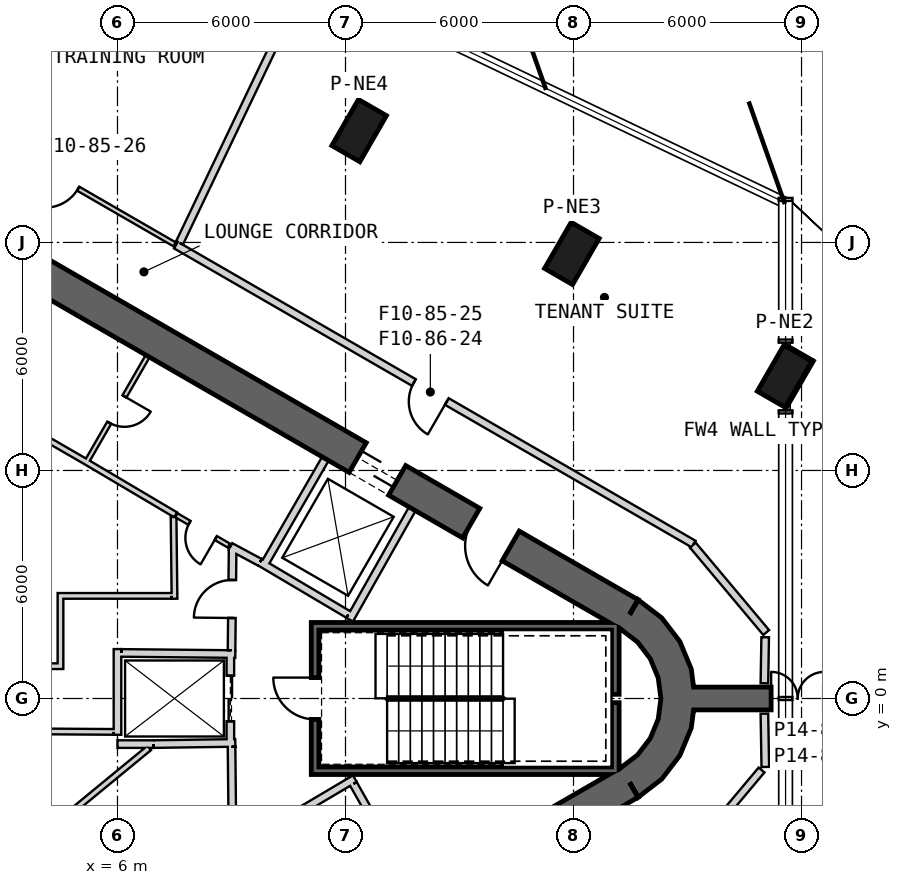
"""IFC4 building model, lengths in metres.
Left out: names, types, materials, properties, quantities, classifications, styles, units other than length and angle.
Written with IfcOpenShell. Run it as: python <this file> out.ifc"""

import sys

from ifc_helpers import new_model, si_unit, direction, frame, frame_2d, origin, origin_2d, place, context, subcontext, project, spatial, polyline, rectangle, outline, extrude, element, fill, save


model = new_model("IFC4")
c1 = context("Model", 3, precision=1e-05, world=origin(), true_north=direction((0.0, 1.0)))
c2 = subcontext(c1, "Body", "Model", "MODEL_VIEW")
j1 = project(units=[si_unit("LENGTHUNIT", "METRE"), si_unit("PLANEANGLEUNIT", "RADIAN")], contexts=[c1])
p1 = place(None, origin())
s1 = spatial("IfcSite", under=j1, at=p1, CompositionType="ELEMENT")
p2 = place(p1, origin())
s2 = spatial("IfcBuilding", under=s1, at=p2, CompositionType="ELEMENT")
p3 = place(p2, frame((0.0, 0.0, 368.9)))
s3 = spatial("IfcBuildingStorey", under=s2, at=p3, CompositionType="ELEMENT", Elevation=368.9)
for number, where, z_axis, x_axis in (
    (1, (23.555, 8.479, 0.0), (0.0, 0.0, 1.0), (0.5, 0.866, 0.0)),
    (2, (17.957, 11.71, 0.0), (0.0, 0.0, 1.0), (0.5, 0.866, 0.0)),
    (3, (12.359, 14.942, 0.0), (0.0, 0.0, 1.0), (0.5, 0.866, 0.0)),
):
    element("IfcColumn", number, at=place(p3, frame(where, z_axis=z_axis, x_axis=x_axis)), inside=s3, PredefinedType="COLUMN", context=c2, shape_type="SweptSolid", body=[
        extrude(rectangle(XDim=1.4, YDim=0.85, at=origin_2d()), origin(), (0.0, 0.0, 1.0), 3.9),
    ])
p4 = place(p3, frame((19.475, 2.208, 0.0), z_axis=(0.0, 0.0, 1.0), x_axis=(-0.866028369851, 0.499994862586, 0.0)))
e4 = element("IfcWall", 4, at=p4, inside=s3, PredefinedType="SHEAR", context=c2, shape_type="SweptSolid", body=[
    extrude(rectangle(XDim=31.523, YDim=0.9, at=frame_2d((15.762, 0.0))), origin(), (0.0, 0.0, 1.0), 3.9),
])
p5 = place(p4, frame((7.062, 0.0, 0.0)))
e5 = element("IfcOpeningElement", 5, at=p5, cuts=e4, PredefinedType="OPENING", context=c2, shape_type="SweptSolid", body=[
    extrude(rectangle(XDim=1.2, YDim=2.4, at=frame_2d((0.6, 1.2))), frame((0.0, 0.46, 0.0), z_axis=(0.0, -1.0, 0.0), x_axis=(1.0, 0.0, 0.0)), (0.0, 0.0, 1.0), 0.92),
])
p6 = place(p4, frame((3.612, 0.0, 0.0)))
e6 = element("IfcOpeningElement", 6, at=p6, cuts=e4, PredefinedType="OPENING", context=c2, shape_type="SweptSolid", body=[
    extrude(rectangle(XDim=1.2, YDim=2.4, at=frame_2d((0.6, 1.2))), frame((0.0, 0.46, 0.0), z_axis=(0.0, -1.0, 0.0), x_axis=(1.0, 0.0, 0.0)), (0.0, 0.0, 1.0), 0.92),
])
p7 = place(p4, frame((26.712, 0.0, 0.0)))
e7 = element("IfcOpeningElement", 7, at=p7, cuts=e4, PredefinedType="OPENING", context=c2, shape_type="SweptSolid", body=[
    extrude(rectangle(XDim=1.2, YDim=2.4, at=frame_2d((0.6, 1.2))), frame((0.0, 0.46, 0.0), z_axis=(0.0, -1.0, 0.0), x_axis=(1.0, 0.0, 0.0)), (0.0, 0.0, 1.0), 0.92),
])
p8 = place(p3, frame((-7.825, -17.97, 0.0), z_axis=(0.0, 0.0, 1.0), x_axis=(0.866028369851, 0.499994862586, 0.0)))
e8 = element("IfcWall", 8, at=p8, inside=s3, PredefinedType="SHEAR", context=c2, shape_type="SweptSolid", body=[
    extrude(rectangle(XDim=31.523, YDim=0.9, at=frame_2d((15.762, 0.0))), origin(), (0.0, 0.0, 1.0), 3.9),
])
p9 = place(p8, frame((17.862, 0.0, 0.0)))
e9 = element("IfcOpeningElement", 9, at=p9, cuts=e8, PredefinedType="OPENING", context=c2, shape_type="SweptSolid", body=[
    extrude(rectangle(XDim=1.2, YDim=2.4, at=frame_2d((0.6, 1.2))), frame((0.0, 0.46, 0.0), z_axis=(0.0, -1.0, 0.0), x_axis=(1.0, 0.0, 0.0)), (0.0, 0.0, 1.0), 0.92),
])
p10 = place(p8, frame((20.562, 0.0, 0.0)))
e10 = element("IfcOpeningElement", 10, at=p10, cuts=e8, PredefinedType="OPENING", context=c2, shape_type="SweptSolid", body=[
    extrude(rectangle(XDim=1.2, YDim=2.4, at=frame_2d((0.6, 1.2))), frame((0.0, 0.46, 0.0), z_axis=(0.0, -1.0, 0.0), x_axis=(1.0, 0.0, 0.0)), (0.0, 0.0, 1.0), 0.92),
])
p11 = place(p8, frame((26.712, 0.0, 0.0)))
e11 = element("IfcOpeningElement", 11, at=p11, cuts=e8, PredefinedType="OPENING", context=c2, shape_type="SweptSolid", body=[
    extrude(rectangle(XDim=1.2, YDim=2.4, at=frame_2d((0.6, 1.2))), frame((0.0, 0.46, 0.0), z_axis=(0.0, -1.0, 0.0), x_axis=(1.0, 0.0, 0.0)), (0.0, 0.0, 1.0), 0.92),
])
p12 = place(p8, frame((3.612, 0.0, 0.0)))
e12 = element("IfcOpeningElement", 12, at=p12, cuts=e8, PredefinedType="OPENING", context=c2, shape_type="SweptSolid", body=[
    extrude(rectangle(XDim=1.2, YDim=2.4, at=frame_2d((0.6, 1.2))), frame((0.0, 0.46, 0.0), z_axis=(0.0, -1.0, 0.0), x_axis=(1.0, 0.0, 0.0)), (0.0, 0.0, 1.0), 0.92),
])
p13 = place(p3, origin())
e13 = element("IfcWall", 13, at=p13, inside=s3, PredefinedType="SHEAR", context=c2, shape_type="SweptSolid", body=[
    extrude(outline(polyline([(19.7, -2.598), (20.321, -2.121), (20.798, -1.5), (21.098, -0.777), (21.2, 0.0), (21.098, 0.777), (20.798, 1.5), (20.321, 2.121), (19.7, 2.598), (19.25, 1.819), (19.685, 1.485), (20.019, 1.05), (20.229, 0.543), (20.3, 0.0), (20.229, -0.543), (20.019, -1.05), (19.685, -1.485), (19.25, -1.819), (19.7, -2.598)])), origin(), (0.0, 0.0, 1.0), 3.9),
])
p14 = place(p3, frame((21.15, 0.0, 0.0), z_axis=(0.0, 0.0, 1.0), x_axis=(1.0, 0.0, 0.0)))
e14 = element("IfcWall", 14, at=p14, inside=s3, PredefinedType="SHEAR", context=c2, shape_type="SweptSolid", body=[
    extrude(rectangle(XDim=6.921, YDim=0.6, at=frame_2d((3.461, 0.0))), origin(), (0.0, 0.0, 1.0), 3.9),
])
p15 = place(p14, frame((1.7, 0.0, 0.0)))
e15 = element("IfcOpeningElement", 15, at=p15, cuts=e14, PredefinedType="OPENING", context=c2, shape_type="SweptSolid", body=[
    extrude(rectangle(XDim=1.4, YDim=2.4, at=frame_2d((0.7, 1.2))), frame((0.0, 0.31, 0.0), z_axis=(0.0, -1.0, 0.0), x_axis=(1.0, 0.0, 0.0)), (0.0, 0.0, 1.0), 0.62),
])
p16 = place(p3, frame((23.569, 7.593, 0.0), z_axis=(0.0, 0.0, 1.0), x_axis=(0.499991248344, 0.866030456496, 0.0)))
e16 = element("IfcWall", 16, at=p16, inside=s3, PredefinedType="SOLIDWALL", context=c2, shape_type="SweptSolid", body=[
    extrude(rectangle(XDim=1.52, YDim=0.06, at=frame_2d((0.76, 0.0))), origin(), (0.0, 0.0, 1.0), 2.61),
])
p17 = place(p3, frame((24.288, 8.898, 0.0), z_axis=(0.0, 0.0, 1.0), x_axis=(-0.866061263272, 0.499937884402, 0.0)))
e17 = element("IfcWall", 17, at=p17, inside=s3, PredefinedType="SOLIDWALL", context=c2, shape_type="SweptSolid", body=[
    extrude(rectangle(XDim=0.85, YDim=0.06, at=frame_2d((0.425, 0.0))), origin(), (0.0, 0.0, 1.0), 3.21),
])
p18 = place(p3, frame((9.847, 3.495, 0.0), z_axis=(0.0, 0.0, 1.0), x_axis=(0.499984717929, 0.866034226713, 0.0)))
e18 = element("IfcWall", 18, at=p18, inside=s3, PredefinedType="PLUMBINGWALL", context=c2, shape_type="SweptSolid", body=[
    extrude(rectangle(XDim=3.25, YDim=0.2, at=frame_2d((1.625, 0.0))), origin(), (0.0, 0.0, 1.0), 3.6),
])
p19 = place(p3, frame((12.11, 2.073, 0.0), z_axis=(0.0, 0.0, 1.0), x_axis=(0.49196600604, 0.870614408852, 0.0)))
e19 = element("IfcWall", 19, at=p19, inside=s3, PredefinedType="PLUMBINGWALL", context=c2, shape_type="SweptSolid", body=[
    extrude(rectangle(XDim=3.35, YDim=0.2, at=frame_2d((1.675, 0.0))), origin(), (0.0, 0.0, 1.0), 3.6),
])
p20 = place(p3, frame((12.073, 2.211, 0.0), z_axis=(0.0, 0.0, 1.0), x_axis=(-0.860414880418, 0.509594185166, 0.0)))
e20 = element("IfcWall", 20, at=p20, inside=s3, PredefinedType="PLUMBINGWALL", context=c2, shape_type="SweptSolid", body=[
    extrude(rectangle(XDim=2.7, YDim=0.2, at=frame_2d((1.35, 0.0))), origin(), (0.0, 0.0, 1.0), 3.6),
])
p21 = place(p3, frame((19.2, 1.9, -0.3), z_axis=(0.0, 0.0, 1.0), x_axis=(-1.0, 0.0, 0.0)))
e21 = element("IfcWall", 21, at=p21, inside=s3, PredefinedType="SHEAR", context=c2, shape_type="SweptSolid", body=[
    extrude(rectangle(XDim=8.1, YDim=0.2, at=frame_2d((4.05, 0.0))), origin(), (0.0, 0.0, 1.0), 3.9),
])
p22 = place(p3, frame((19.1, -2.0, -0.3), z_axis=(0.0, 0.0, 1.0), x_axis=(0.0, 1.0, 0.0)))
e22 = element("IfcWall", 22, at=p22, inside=s3, PredefinedType="SHEAR", context=c2, shape_type="SweptSolid", body=[
    extrude(rectangle(XDim=1.89, YDim=0.2, at=frame_2d((0.945, 0.0))), origin(), (0.0, 0.0, 1.0), 3.9),
])
p23 = place(p3, frame((19.1, 0.11, -0.3), z_axis=(0.0, 0.0, 1.0), x_axis=(0.0, 1.0, 0.0)))
e23 = element("IfcWall", 23, at=p23, inside=s3, PredefinedType="SHEAR", context=c2, shape_type="SweptSolid", body=[
    extrude(rectangle(XDim=1.69, YDim=0.2, at=frame_2d((0.845, 0.0))), origin(), (0.0, 0.0, 1.0), 3.9),
])
p24 = place(p3, frame((11.1, -1.9, -0.3), z_axis=(0.0, 0.0, 1.0), x_axis=(1.0, 0.0, 0.0)))
e24 = element("IfcWall", 24, at=p24, inside=s3, PredefinedType="SHEAR", context=c2, shape_type="SweptSolid", body=[
    extrude(rectangle(XDim=7.9, YDim=0.2, at=frame_2d((3.95, 0.0))), origin(), (0.0, 0.0, 1.0), 3.9),
])
p25 = place(p3, frame((11.2, -1.8, -0.3), z_axis=(0.0, 0.0, 1.0), x_axis=(0.0, 1.0, 0.0)))
e25 = element("IfcWall", 25, at=p25, inside=s3, PredefinedType="SHEAR", context=c2, shape_type="SweptSolid", body=[
    extrude(rectangle(XDim=3.6, YDim=0.2, at=frame_2d((1.8, 0.0))), origin(), (0.0, 0.0, 1.0), 3.9),
])
p26 = place(p25, frame((1.25, 0.0, 0.3)))
e26 = element("IfcOpeningElement", 26, at=p26, cuts=e25, PredefinedType="OPENING", context=c2, shape_type="SweptSolid", body=[
    extrude(rectangle(XDim=1.1, YDim=2.1, at=frame_2d((0.55, 1.05))), frame((0.0, 0.11, 0.0), z_axis=(0.0, -1.0, 0.0), x_axis=(1.0, 0.0, 0.0)), (0.0, 0.0, 1.0), 0.22),
])
p27 = place(p3, frame((8.97, 1.2, 0.0), z_axis=(0.0, 0.0, 1.0), x_axis=(0.0, -1.0, 0.0)))
e27 = element("IfcWall", 27, at=p27, inside=s3, PredefinedType="PLUMBINGWALL", context=c2, shape_type="SweptSolid", body=[
    extrude(rectangle(XDim=2.4, YDim=0.2, at=frame_2d((1.2, 0.0))), origin(), (0.0, 0.0, 1.0), 3.6),
])
p28 = place(p27, frame((0.6, 0.0, 0.0)))
e28 = element("IfcOpeningElement", 28, at=p28, cuts=e27, PredefinedType="OPENING", context=c2, shape_type="SweptSolid", body=[
    extrude(rectangle(XDim=1.2, YDim=2.4, at=frame_2d((0.6, 1.2))), frame((0.0, 0.11, 0.0), z_axis=(0.0, -1.0, 0.0), x_axis=(1.0, 0.0, 0.0)), (0.0, 0.0, 1.0), 0.22),
])
p29 = place(p3, frame((6.0, 1.2, 0.0), z_axis=(0.0, 0.0, 1.0), x_axis=(0.999949988, -0.010001074852, 0.0)))
e29 = element("IfcWall", 29, at=p29, inside=s3, PredefinedType="PLUMBINGWALL", context=c2, shape_type="SweptSolid", body=[
    extrude(rectangle(XDim=3.1, YDim=0.2, at=frame_2d((1.55, 0.0))), origin(), (0.0, 0.0, 1.0), 3.6),
])
p30 = place(p3, frame((5.9, -1.201, 0.0), z_axis=(0.0, 0.0, 1.0), x_axis=(0.999950064753, 0.009993397809, 0.0)))
e30 = element("IfcWall", 30, at=p30, inside=s3, PredefinedType="PLUMBINGWALL", context=c2, shape_type="SweptSolid", body=[
    extrude(rectangle(XDim=3.2, YDim=0.2, at=frame_2d((1.6, 0.0))), origin(), (0.0, 0.0, 1.0), 3.6),
])
p31 = place(p3, frame((6.0, -1.1, 0.0), z_axis=(0.0, 0.0, 1.0), x_axis=(0.0, 1.0, 0.0)))
e31 = element("IfcWall", 31, at=p31, inside=s3, PredefinedType="PLUMBINGWALL", context=c2, shape_type="SweptSolid", body=[
    extrude(rectangle(XDim=2.28, YDim=0.2, at=frame_2d((1.14, 0.0))), origin(), (0.0, 0.0, 1.0), 3.6),
])
p32 = place(p3, frame((5.17, 6.195, 0.0), z_axis=(0.0, 0.0, 1.0), x_axis=(0.499984717929, 0.866034226713, 0.0)))
e32 = element("IfcWall", 32, at=p32, inside=s3, PredefinedType="PARTITIONING", context=c2, shape_type="SweptSolid", body=[
    extrude(rectangle(XDim=3.25, YDim=0.12, at=frame_2d((1.625, 0.0))), origin(), (0.0, 0.0, 1.0), 3.6),
])
p33 = place(p32, frame((1.225, 0.0, 0.0)))
e33 = element("IfcOpeningElement", 33, at=p33, cuts=e32, PredefinedType="OPENING", context=c2, shape_type="SweptSolid", body=[
    extrude(rectangle(XDim=0.8, YDim=2.1, at=frame_2d((0.4, 1.05))), frame((0.0, 0.07, 0.0), z_axis=(0.0, -1.0, 0.0), x_axis=(1.0, 0.0, 0.0)), (0.0, 0.0, 1.0), 0.14),
])
p34 = place(p3, frame((8.974, 3.999, 0.0), z_axis=(0.0, 0.0, 1.0), x_axis=(0.880917147855, -0.473270513147, 0.0)))
e34 = element("IfcWall", 34, at=p34, inside=s3, PredefinedType="PARTITIONING", context=c2, shape_type="SweptSolid", body=[
    extrude(rectangle(XDim=0.878, YDim=0.2, at=frame_2d((0.439, 0.0))), origin(), (0.0, 0.0, 1.0), 3.6),
])
p35 = place(p3, frame((8.931, 4.025, 0.0), z_axis=(0.0, 0.0, 1.0), x_axis=(-0.862666884027, 0.505772525157, 0.0)))
e35 = element("IfcWall", 35, at=p35, inside=s3, PredefinedType="PLUMBINGWALL", context=c2, shape_type="SweptSolid", body=[
    extrude(rectangle(XDim=4.372, YDim=0.15, at=frame_2d((2.186, 0.0))), origin(), (0.0, 0.0, 1.0), 3.6),
])
p36 = place(p3, frame((5.159, 6.236, 0.0), z_axis=(0.0, 0.0, 1.0), x_axis=(-0.868105023632, 0.496380567654, 0.0)))
e36 = element("IfcWall", 36, at=p36, inside=s3, PredefinedType="PLUMBINGWALL", context=c2, shape_type="SweptSolid", body=[
    extrude(rectangle(XDim=7.072, YDim=0.15, at=frame_2d((3.536, 0.0))), origin(), (0.0, 0.0, 1.0), 3.6),
])
p37 = place(p3, frame((12.245, -2.109, 0.0), z_axis=(0.0, 0.0, 1.0), x_axis=(-0.860414880418, -0.509594185166, 0.0)))
e37 = element("IfcWall", 37, at=p37, inside=s3, PredefinedType="PARTITIONING", context=c2, shape_type="SweptSolid", body=[
    extrude(rectangle(XDim=2.7, YDim=0.2, at=frame_2d((1.35, 0.0))), origin(), (0.0, 0.0, 1.0), 3.6),
])
p38 = place(p3, frame((13.758, -4.99, 0.0), z_axis=(0.0, 0.0, 1.0), x_axis=(-0.491993409184, 0.87059892334, 0.0)))
e38 = element("IfcWall", 38, at=p38, inside=s3, PredefinedType="PARTITIONING", context=c2, shape_type="SweptSolid", body=[
    extrude(rectangle(XDim=3.15, YDim=0.2, at=frame_2d((1.575, 0.0))), origin(), (0.0, 0.0, 1.0), 3.6),
])
p39 = place(p38, frame((1.175, 0.0, 0.0)))
e39 = element("IfcOpeningElement", 39, at=p39, cuts=e38, PredefinedType="OPENING", context=c2, shape_type="SweptSolid", body=[
    extrude(rectangle(XDim=0.8, YDim=2.1, at=frame_2d((0.4, 1.05))), frame((0.0, 0.11, 0.0), z_axis=(0.0, -1.0, 0.0), x_axis=(1.0, 0.0, 0.0)), (0.0, 0.0, 1.0), 0.22),
])
p40 = place(p3, frame((9.001, 1.27, 0.0), z_axis=(0.0, 0.0, 1.0), x_axis=(0.01074821465, 0.999942236273, 0.0)))
e40 = element("IfcWall", 40, at=p40, inside=s3, PredefinedType="PARTITIONING", context=c2, shape_type="SweptSolid", body=[
    extrude(rectangle(XDim=2.726, YDim=0.2, at=frame_2d((1.363, 0.0))), origin(), (0.0, 0.0, 1.0), 3.6),
])
p41 = place(p3, frame((9.029, -3.851, 0.0), z_axis=(0.0, 0.0, 1.0), x_axis=(-0.010783593937, 0.99994185536, 0.0)))
e41 = element("IfcWall", 41, at=p41, inside=s3, PredefinedType="PARTITIONING", context=c2, shape_type="SweptSolid", body=[
    extrude(rectangle(XDim=2.581, YDim=0.2, at=frame_2d((1.291, 0.0))), origin(), (0.0, 0.0, 1.0), 3.6),
])
p42 = place(p41, frame((0.791, 0.0, 0.0)))
e42 = element("IfcOpeningElement", 42, at=p42, cuts=e41, PredefinedType="OPENING", context=c2, shape_type="SweptSolid", body=[
    extrude(rectangle(XDim=1.0, YDim=2.1, at=frame_2d((0.5, 1.05))), frame((0.0, 0.11, 0.0), z_axis=(0.0, -1.0, 0.0), x_axis=(1.0, 0.0, 0.0)), (0.0, 0.0, 1.0), 0.22),
])
p43 = place(p3, frame((1.388, 1.074, 0.0), z_axis=(0.0, 0.0, 1.0), x_axis=(0.99997856967, 0.006546770205, 0.0)))
e43 = element("IfcWall", 43, at=p43, inside=s3, PredefinedType="PLUMBINGWALL", context=c2, shape_type="SweptSolid", body=[
    extrude(rectangle(XDim=4.512, YDim=0.15, at=frame_2d((2.256, 0.0))), origin(), (0.0, 0.0, 1.0), 3.6),
])
p44 = place(p43, frame((1.92, 0.0, 0.0)))
e44 = element("IfcOpeningElement", 44, at=p44, cuts=e43, PredefinedType="OPENING", context=c2, shape_type="SweptSolid", body=[
    extrude(rectangle(XDim=0.8, YDim=2.1, at=frame_2d((0.4, 1.05))), frame((0.0, 0.085, 0.0), z_axis=(0.0, -1.0, 0.0), x_axis=(1.0, 0.0, 0.0)), (0.0, 0.0, 1.0), 0.17),
])
p45 = place(p3, frame((4.56, -1.075, 0.0), z_axis=(0.0, 0.0, 1.0), x_axis=(-1.0, 0.0, 0.0)))
e45 = element("IfcWall", 45, at=p45, inside=s3, PredefinedType="PARTITIONING", context=c2, shape_type="SweptSolid", body=[
    extrude(rectangle(XDim=3.026, YDim=0.12, at=frame_2d((1.513, 0.0))), origin(), (0.0, 0.0, 1.0), 3.6),
])
p46 = place(p3, frame((4.5, -2.76, 0.0), z_axis=(0.0, 0.0, 1.0), x_axis=(0.0, 1.0, 0.0)))
e46 = element("IfcWall", 46, at=p46, inside=s3, PredefinedType="PARTITIONING", context=c2, shape_type="SweptSolid", body=[
    extrude(rectangle(XDim=1.625, YDim=0.12, at=frame_2d((0.812, 0.0))), origin(), (0.0, 0.0, 1.0), 3.6),
])
p47 = place(p3, frame((7.56, -2.7, 0.0), z_axis=(0.0, 0.0, 1.0), x_axis=(-1.0, 0.0, 0.0)))
e47 = element("IfcWall", 47, at=p47, inside=s3, PredefinedType="PARTITIONING", context=c2, shape_type="SweptSolid", body=[
    extrude(rectangle(XDim=3.0, YDim=0.12, at=frame_2d((1.5, 0.0))), origin(), (0.0, 0.0, 1.0), 3.6),
])
p48 = place(p3, frame((7.475, -4.865, 0.0), z_axis=(0.0, 0.0, 1.0), x_axis=(0.011716133148, 0.999931363757, 0.0)))
e48 = element("IfcWall", 48, at=p48, inside=s3, PredefinedType="PARTITIONING", context=c2, shape_type="SweptSolid", body=[
    extrude(rectangle(XDim=2.105, YDim=0.12, at=frame_2d((1.052, 0.0))), origin(), (0.0, 0.0, 1.0), 3.6),
])
p49 = place(p3, frame((21.518, 4.551, 0.0), z_axis=(0.0, 0.0, 1.0), x_axis=(-0.866027594353, 0.499996205806, 0.0)))
e49 = element("IfcWall", 49, at=p49, inside=s3, PredefinedType="PARTITIONING", context=c2, shape_type="SweptSolid", body=[
    extrude(rectangle(XDim=8.775, YDim=0.12, at=frame_2d((4.387, 0.0))), origin(), (0.0, 0.0, 1.0), 2.97),
])
p50 = place(p49, frame((3.86, 0.0, 0.0)))
e50 = element("IfcOpeningElement", 50, at=p50, cuts=e49, PredefinedType="OPENING", context=c2, shape_type="SweptSolid", body=[
    extrude(rectangle(XDim=1.0, YDim=2.1, at=frame_2d((0.5, 1.05))), frame((0.0, 0.07, 0.0), z_axis=(0.0, -1.0, 0.0), x_axis=(1.0, 0.0, 0.0)), (0.0, 0.0, 1.0), 0.14),
])
p51 = place(p3, frame((23.52, 2.133, 0.0), z_axis=(0.0, 0.0, 1.0), x_axis=(-0.642792120468, 0.766040658101, 0.0)))
e51 = element("IfcWall", 51, at=p51, inside=s3, PredefinedType="PARTITIONING", context=c2, shape_type="SweptSolid", body=[
    extrude(rectangle(XDim=3.136, YDim=0.12, at=frame_2d((1.568, 0.0))), origin(), (0.0, 0.0, 1.0), 2.58),
])
p52 = place(p3, frame((13.918, 8.938, 0.0), z_axis=(0.0, 0.0, 1.0), x_axis=(-0.866024903792, 0.500000866012, 0.0)))
e52 = element("IfcWall", 52, at=p52, inside=s3, PredefinedType="PARTITIONING", context=c2, shape_type="SweptSolid", body=[
    extrude(rectangle(XDim=23.784, YDim=0.2, at=frame_2d((11.892, 0.0))), origin(), (0.0, 0.0, 1.0), 2.97),
])
p53 = place(p52, frame((11.456, 0.0, 0.0)))
e53 = element("IfcOpeningElement", 53, at=p53, cuts=e52, PredefinedType="OPENING", context=c2, shape_type="SweptSolid", body=[
    extrude(rectangle(XDim=1.0, YDim=2.1, at=frame_2d((0.5, 1.05))), frame((0.0, 0.11, 0.0), z_axis=(0.0, -1.0, 0.0), x_axis=(1.0, 0.0, 0.0)), (0.0, 0.0, 1.0), 0.22),
])
p54 = place(p3, frame((13.924, 9.005, 0.0), z_axis=(0.0, 0.0, 1.0), x_axis=(0.431214181917, 0.90224959369, 0.0)))
e54 = element("IfcWall", 54, at=p54, inside=s3, PredefinedType="PARTITIONING", context=c2, shape_type="SweptSolid", body=[
    extrude(rectangle(XDim=7.805, YDim=0.2, at=frame_2d((3.902, 0.0))), origin(), (0.0, 0.0, 1.0), 3.07),
])
p55 = place(p3, frame((21.427, -4.627, 0.0), z_axis=(0.0, 0.0, 1.0), x_axis=(0.64281389261, 0.766022388359, 0.0)))
e55 = element("IfcWall", 55, at=p55, inside=s3, PredefinedType="PARTITIONING", context=c2, shape_type="SweptSolid", body=[
    extrude(rectangle(XDim=3.256, YDim=0.12, at=frame_2d((1.628, 0.0))), origin(), (0.0, 0.0, 1.0), 2.58),
])
p56 = place(p26, origin())
e56 = element("IfcDoor", 56, at=p56, inside=s3, OperationType="SINGLE_SWING_RIGHT", PredefinedType="USERDEFINED", context=c2, shape_type="SweptSolid", body=[
    extrude(rectangle(XDim=1.1, YDim=2.1, at=frame_2d((0.55, 1.05))), frame((0.0, 0.025, 0.0), z_axis=(0.0, -1.0, 0.0), x_axis=(1.0, 0.0, 0.0)), (0.0, 0.0, 1.0), 0.05),
])
fill(e26, e56)
p57 = place(p42, origin())
e57 = element("IfcDoor", 57, at=p57, inside=s3, OperationType="SINGLE_SWING_RIGHT", PredefinedType="USERDEFINED", context=c2, shape_type="SweptSolid", body=[
    extrude(rectangle(XDim=1.0, YDim=2.1, at=frame_2d((0.5, 1.05))), frame((0.0, 0.025, 0.0), z_axis=(0.0, -1.0, 0.0), x_axis=(1.0, 0.0, 0.0)), (0.0, 0.0, 1.0), 0.05),
])
fill(e42, e57)
p58 = place(p28, origin())
e58 = element("IfcDoor", 58, at=p58, inside=s3, OperationType="SLIDING_TO_LEFT", PredefinedType="USERDEFINED", context=c2, shape_type="SweptSolid", body=[
    extrude(rectangle(XDim=1.2, YDim=2.4, at=frame_2d((0.6, 1.2))), frame((0.0, 0.025, 0.0), z_axis=(0.0, -1.0, 0.0), x_axis=(1.0, 0.0, 0.0)), (0.0, 0.0, 1.0), 0.05),
])
fill(e28, e58)
p59 = place(p33, origin())
e59 = element("IfcDoor", 59, at=p59, inside=s3, OperationType="SINGLE_SWING_RIGHT", PredefinedType="USERDEFINED", context=c2, shape_type="SweptSolid", body=[
    extrude(rectangle(XDim=0.8, YDim=2.1, at=frame_2d((0.4, 1.05))), frame((0.0, 0.025, 0.0), z_axis=(0.0, -1.0, 0.0), x_axis=(1.0, 0.0, 0.0)), (0.0, 0.0, 1.0), 0.05),
])
fill(e33, e59)
p60 = place(p50, origin())
e60 = element("IfcDoor", 60, at=p60, inside=s3, OperationType="SINGLE_SWING_RIGHT", PredefinedType="NOTDEFINED", context=c2, shape_type="SweptSolid", body=[
    extrude(rectangle(XDim=1.0, YDim=2.1, at=frame_2d((0.5, 1.05))), frame((0.0, 0.025, 0.0), z_axis=(0.0, -1.0, 0.0), x_axis=(1.0, 0.0, 0.0)), (0.0, 0.0, 1.0), 0.05),
])
fill(e50, e60)
p61 = place(p5, origin())
e61 = element("IfcDoor", 61, at=p61, inside=s3, OperationType="SLIDING_TO_LEFT", PredefinedType="USERDEFINED", context=c2, shape_type="SweptSolid", body=[
    extrude(rectangle(XDim=1.2, YDim=2.4, at=frame_2d((0.6, 1.2))), frame((0.0, 0.025, 0.0), z_axis=(0.0, -1.0, 0.0), x_axis=(1.0, 0.0, 0.0)), (0.0, 0.0, 1.0), 0.05),
])
fill(e5, e61)
p62 = place(p6, origin())
e62 = element("IfcDoor", 62, at=p62, inside=s3, OperationType="SINGLE_SWING_LEFT", PredefinedType="USERDEFINED", context=c2, shape_type="SweptSolid", body=[
    extrude(rectangle(XDim=1.2, YDim=2.4, at=frame_2d((0.6, 1.2))), frame((0.0, 0.025, 0.0), z_axis=(0.0, -1.0, 0.0), x_axis=(1.0, 0.0, 0.0)), (0.0, 0.0, 1.0), 0.05),
])
fill(e6, e62)
p63 = place(p15, origin())
e63 = element("IfcDoor", 63, at=p63, inside=s3, OperationType="DOUBLE_DOOR_SINGLE_SWING", PredefinedType="NOTDEFINED", context=c2, shape_type="SweptSolid", body=[
    extrude(rectangle(XDim=1.4, YDim=2.4, at=frame_2d((0.7, 1.2))), frame((0.0, 0.025, 0.0), z_axis=(0.0, -1.0, 0.0), x_axis=(1.0, 0.0, 0.0)), (0.0, 0.0, 1.0), 0.05),
])
fill(e15, e63)
save(model, sys.argv[1])
